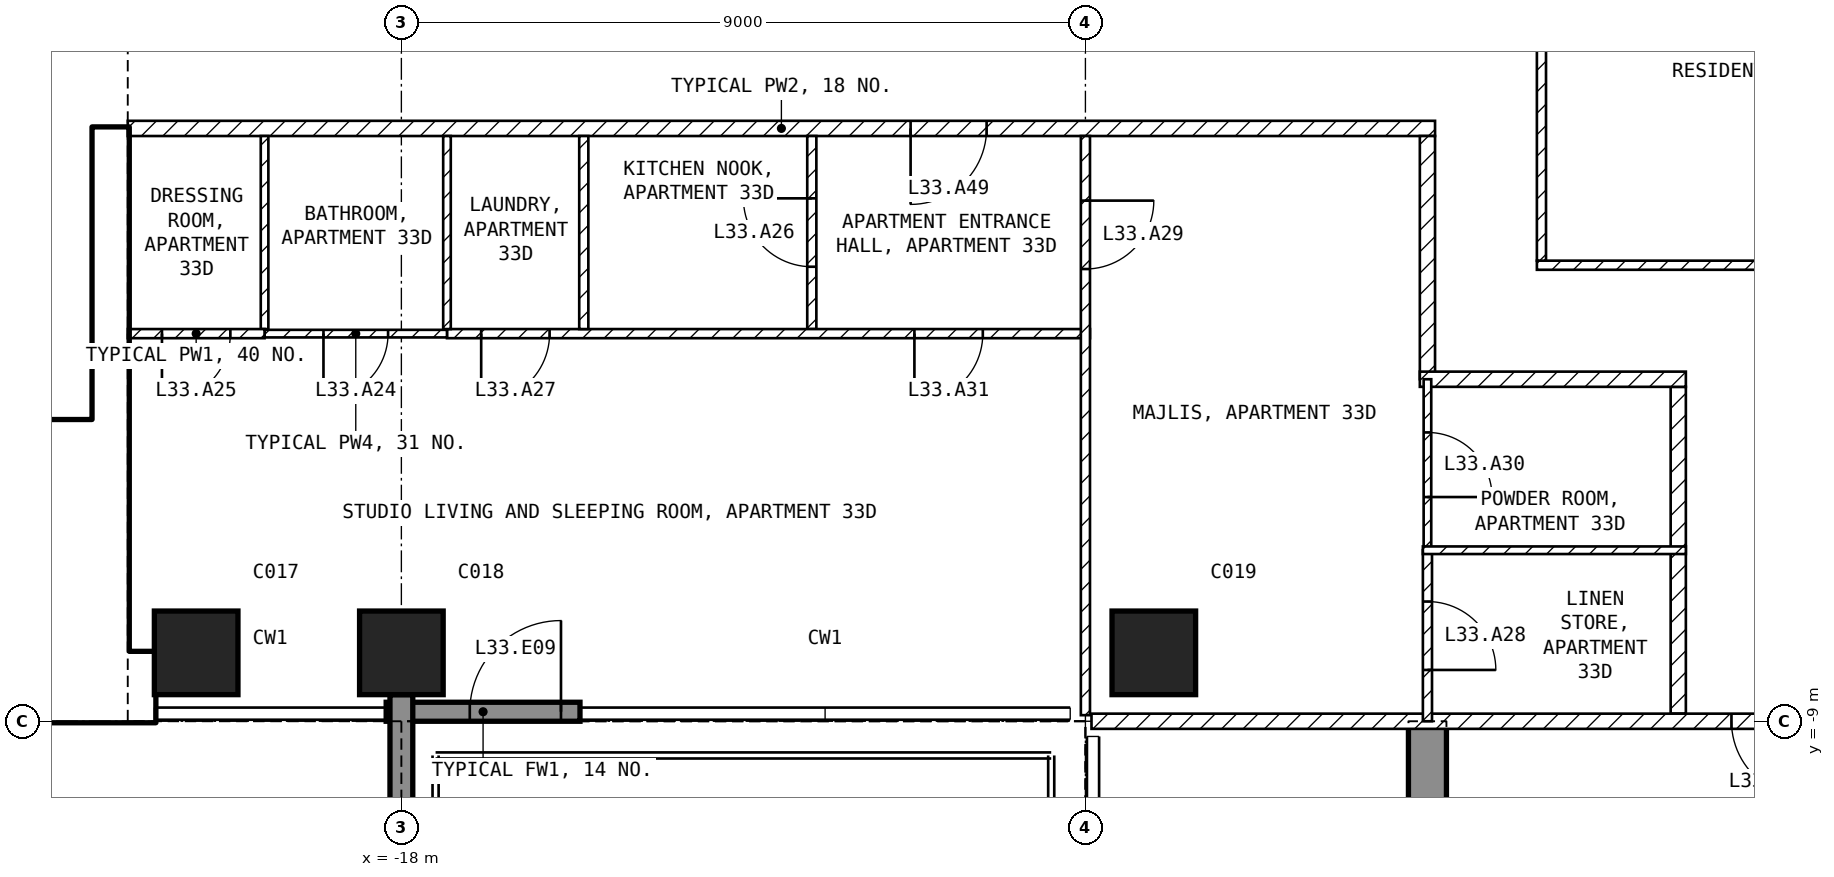
"""IFC4 building model, lengths in metres.
Left out: names, types, materials, properties, quantities, classifications, styles, units other than length and angle.
Written with IfcOpenShell. Run it as: python <this file> out.ifc"""

import sys

from ifc_helpers import new_model, si_unit, direction, frame, frame_2d, origin, origin_2d, place, context, subcontext, project, spatial, polyline, rectangle, outline, extrude, element, fill, save


model = new_model("IFC4")
c1 = context("Model", 3, precision=1e-05, world=origin(), true_north=direction((0.0, 1.0)))
c2 = subcontext(c1, "Body", "Model", "MODEL_VIEW")
j1 = project(units=[si_unit("LENGTHUNIT", "METRE"), si_unit("PLANEANGLEUNIT", "RADIAN")], contexts=[c1])
p1 = place(None, origin())
s1 = spatial("IfcSite", under=j1, at=p1, CompositionType="ELEMENT")
p2 = place(p1, origin())
s2 = spatial("IfcBuilding", under=s1, at=p2, CompositionType="ELEMENT")
p3 = place(p2, frame((0.0, 0.0, 137.4)))
s3 = spatial("IfcBuildingStorey", under=s2, at=p3, CompositionType="ELEMENT", Elevation=137.4)
for number, where, z_axis, x_axis in (
    (1, (-20.7, -8.1, -0.25), (0.0, 0.0, 1.0), (1.0, 0.0, 0.0)),
    (2, (-18.0, -8.1, -0.25), (0.0, 0.0, 1.0), (1.0, 0.0, 0.0)),
    (3, (-8.1, -8.1, -0.25), (0.0, 0.0, 1.0), (1.0, 0.0, 0.0)),
):
    element("IfcColumn", number, at=place(p3, frame(where, z_axis=z_axis, x_axis=x_axis)), inside=s3, PredefinedType="COLUMN", context=c2, shape_type="SweptSolid", body=[
        extrude(rectangle(XDim=1.1, YDim=1.1, at=origin_2d()), origin(), (0.0, 0.0, 1.0), 3.5),
    ])
p4 = place(p3, frame((-4.75, -20.15, -0.25), z_axis=(1.0, 0.0, 0.0), x_axis=(0.0, 1.0, 0.0)))
e4 = element("IfcWall", 4, at=p4, inside=s3, PredefinedType="SHEAR", context=c2, shape_type="SweptSolid", body=[
    extrude(outline(polyline([(0.0, 0.0), (6.65, 0.0), (6.65, 2.65), (9.05, 2.65), (9.05, 0.0), (11.15, 0.0), (11.15, 3.5), (0.0, 3.5), (0.0, 0.0)])), origin(), (0.0, 0.0, 1.0), 0.5),
])
p5 = place(p3, frame((-18.2, -8.875, 0.0), z_axis=(0.0, 0.0, 1.0), x_axis=(1.0, 0.0, 0.0)))
e5 = element("IfcWall", 5, at=p5, inside=s3, PredefinedType="SOLIDWALL", context=c2, shape_type="SweptSolid", body=[
    extrude(rectangle(XDim=2.55, YDim=0.25, at=frame_2d((1.275, 0.0))), origin(), (0.0, 0.0, 1.0), 3.25),
])
p6 = place(p5, frame((1.1, 0.0, 0.0)))
e6 = element("IfcOpeningElement", 6, at=p6, cuts=e5, PredefinedType="OPENING", context=c2, shape_type="SweptSolid", body=[
    extrude(rectangle(XDim=1.2, YDim=2.4, at=frame_2d((0.6, 1.2))), frame((0.0, 0.135, 0.0), z_axis=(0.0, -1.0, 0.0), x_axis=(1.0, 0.0, 0.0)), (0.0, 0.0, 1.0), 0.27),
])
p7 = place(p3, frame((-18.0, -8.65, 0.0), z_axis=(0.0, 0.0, 1.0), x_axis=(0.0, -1.0, 0.0)))
e7 = element("IfcWall", 7, at=p7, inside=s3, PredefinedType="SOLIDWALL", context=c2, shape_type="SweptSolid", body=[
    extrude(rectangle(XDim=3.09, YDim=0.3, at=frame_2d((1.545, 0.0))), origin(), (0.0, 0.0, 1.0), 3.25),
])
p8 = place(p3, frame((-30.2, -8.55, 0.0), z_axis=(0.0, 0.0, 1.0), x_axis=(1.0, 0.0, 0.0)))
e8 = element("IfcWall", 8, at=p8, inside=s3, PredefinedType="SHEAR", context=c2, shape_type="SweptSolid", body=[
    extrude(rectangle(XDim=8.95, YDim=0.9, at=frame_2d((4.475, 0.0))), origin(), (0.0, 0.0, 1.0), 3.25),
])
p9 = place(p3, frame((-21.825, -8.1, 0.0), z_axis=(0.0, 0.0, 1.0), x_axis=(0.0, 1.0, 0.0)))
e9 = element("IfcWall", 9, at=p9, inside=s3, PredefinedType="SHEAR", context=c2, shape_type="SweptSolid", body=[
    extrude(rectangle(XDim=6.9, YDim=0.45, at=frame_2d((3.45, 0.0))), origin(), (0.0, 0.0, 1.0), 3.25),
])
p10 = place(p3, frame((-28.35, -5.15, 0.0), z_axis=(0.0, 0.0, 1.0), x_axis=(1.0, 0.0, 0.0)))
e10 = element("IfcWall", 10, at=p10, inside=s3, PredefinedType="SOLIDWALL", context=c2, shape_type="SweptSolid", body=[
    extrude(rectangle(XDim=6.3, YDim=0.2, at=frame_2d((3.15, 0.0))), origin(), (0.0, 0.0, 1.0), 3.25),
])
p11 = place(p10, frame((5.1, 0.0, 0.0)))
e11 = element("IfcOpeningElement", 11, at=p11, cuts=e10, PredefinedType="OPENING", context=c2, shape_type="SweptSolid", body=[
    extrude(rectangle(XDim=1.0, YDim=2.1, at=frame_2d((0.5, 1.05))), frame((0.0, 0.11, 0.0), z_axis=(0.0, -1.0, 0.0), x_axis=(1.0, 0.0, 0.0)), (0.0, 0.0, 1.0), 0.22),
])
p12 = place(p3, frame((-3.06, -3.0, 0.0), z_axis=(0.0, 0.0, 1.0), x_axis=(1.0, 0.0, 0.0)))
e12 = element("IfcWall", 12, at=p12, inside=s3, PredefinedType="PARTITIONING", context=c2, shape_type="SweptSolid", body=[
    extrude(rectangle(XDim=6.12, YDim=0.12, at=frame_2d((3.06, 0.0))), origin(), (0.0, 0.0, 1.0), 3.25),
])
p13 = place(p3, frame((-3.0, 2.94, 0.0), z_axis=(0.0, 0.0, 1.0), x_axis=(0.0, -1.0, 0.0)))
e13 = element("IfcWall", 13, at=p13, inside=s3, PredefinedType="PARTITIONING", context=c2, shape_type="SweptSolid", body=[
    extrude(rectangle(XDim=5.88, YDim=0.12, at=frame_2d((2.94, 0.0))), origin(), (0.0, 0.0, 1.0), 3.25),
])
p14 = place(p3, frame((-4.4, -1.2, 0.0), z_axis=(0.0, 0.0, 1.0), x_axis=(-1.0, 0.0, 0.0)))
e14 = element("IfcWall", 14, at=p14, inside=s3, PredefinedType="PARTITIONING", context=c2, shape_type="SweptSolid", body=[
    extrude(rectangle(XDim=17.2, YDim=0.2, at=frame_2d((8.6, 0.0))), origin(), (0.0, 0.0, 1.0), 3.25),
])
p15 = place(p14, frame((5.9, 0.0, 0.0)))
e15 = element("IfcOpeningElement", 15, at=p15, cuts=e14, PredefinedType="OPENING", context=c2, shape_type="SweptSolid", body=[
    extrude(rectangle(XDim=1.0, YDim=2.1, at=frame_2d((0.5, 1.05))), frame((0.0, 0.11, 0.0), z_axis=(0.0, -1.0, 0.0), x_axis=(1.0, 0.0, 0.0)), (0.0, 0.0, 1.0), 0.22),
])
p16 = place(p3, frame((-4.5, -4.5, 0.0), z_axis=(0.0, 0.0, 1.0), x_axis=(0.0, 1.0, 0.0)))
e16 = element("IfcWall", 16, at=p16, inside=s3, PredefinedType="PARTITIONING", context=c2, shape_type="SweptSolid", body=[
    extrude(rectangle(XDim=3.2, YDim=0.2, at=frame_2d((1.6, 0.0))), origin(), (0.0, 0.0, 1.0), 3.25),
])
p17 = place(p3, frame((-1.2, -8.9, 0.0), z_axis=(0.0, 0.0, 1.0), x_axis=(0.0, 1.0, 0.0)))
e17 = element("IfcWall", 17, at=p17, inside=s3, PredefinedType="PARTITIONING", context=c2, shape_type="SweptSolid", body=[
    extrude(rectangle(XDim=4.3, YDim=0.2, at=frame_2d((2.15, 0.0))), origin(), (0.0, 0.0, 1.0), 3.25),
])
p18 = place(p3, frame((-1.1, -4.5, 0.0), z_axis=(0.0, 0.0, 1.0), x_axis=(-1.0, 0.0, 0.0)))
e18 = element("IfcWall", 18, at=p18, inside=s3, PredefinedType="PARTITIONING", context=c2, shape_type="SweptSolid", body=[
    extrude(rectangle(XDim=3.5, YDim=0.2, at=frame_2d((1.75, 0.0))), origin(), (0.0, 0.0, 1.0), 3.25),
])
p19 = place(p3, frame((8.92, -9.0, 0.0), z_axis=(0.0, 0.0, 1.0), x_axis=(-1.0, 0.0, 0.0)))
e19 = element("IfcWall", 19, at=p19, inside=s3, PredefinedType="PARTITIONING", context=c2, shape_type="SweptSolid", body=[
    extrude(rectangle(XDim=17.84, YDim=0.2, at=frame_2d((8.92, 0.0))), origin(), (0.0, 0.0, 1.0), 3.25),
])
p20 = place(p19, frame((8.42, 0.0, 0.0)))
e20 = element("IfcOpeningElement", 20, at=p20, cuts=e19, PredefinedType="OPENING", context=c2, shape_type="SweptSolid", body=[
    extrude(rectangle(XDim=1.0, YDim=2.1, at=frame_2d((0.5, 1.05))), frame((0.0, 0.11, 0.0), z_axis=(0.0, -1.0, 0.0), x_axis=(1.0, 0.0, 0.0)), (0.0, 0.0, 1.0), 0.22),
])
p21 = place(p3, frame((-12.6, -3.84, 0.0), z_axis=(0.0, 0.0, 1.0), x_axis=(0.0, 1.0, 0.0)))
e21 = element("IfcWall", 21, at=p21, inside=s3, PredefinedType="PARTITIONING", context=c2, shape_type="SweptSolid", body=[
    extrude(rectangle(XDim=2.54, YDim=0.12, at=frame_2d((1.27, 0.0))), origin(), (0.0, 0.0, 1.0), 3.25),
])
p22 = place(p21, frame((0.82, 0.0, 0.0)))
e22 = element("IfcOpeningElement", 22, at=p22, cuts=e21, PredefinedType="OPENING", context=c2, shape_type="SweptSolid", body=[
    extrude(rectangle(XDim=0.9, YDim=2.1, at=frame_2d((0.45, 1.05))), frame((0.0, 0.07, 0.0), z_axis=(0.0, -1.0, 0.0), x_axis=(1.0, 0.0, 0.0)), (0.0, 0.0, 1.0), 0.14),
])
p23 = place(p3, frame((-8.94, -3.9, 0.0), z_axis=(0.0, 0.0, 1.0), x_axis=(-1.0, 0.0, 0.0)))
e23 = element("IfcWall", 23, at=p23, inside=s3, PredefinedType="PARTITIONING", context=c2, shape_type="SweptSolid", body=[
    extrude(rectangle(XDim=8.46, YDim=0.12, at=frame_2d((4.23, 0.0))), origin(), (0.0, 0.0, 1.0), 3.25),
])
p24 = place(p23, frame((7.11, 0.0, 0.0)))
e24 = element("IfcOpeningElement", 24, at=p24, cuts=e23, PredefinedType="OPENING", context=c2, shape_type="SweptSolid", body=[
    extrude(rectangle(XDim=0.9, YDim=2.1, at=frame_2d((0.45, 1.05))), frame((0.0, 0.07, 0.0), z_axis=(0.0, -1.0, 0.0), x_axis=(1.0, 0.0, 0.0)), (0.0, 0.0, 1.0), 0.14),
])
p25 = place(p23, frame((1.41, 0.0, 0.0)))
e25 = element("IfcOpeningElement", 25, at=p25, cuts=e23, PredefinedType="OPENING", context=c2, shape_type="SweptSolid", body=[
    extrude(rectangle(XDim=0.9, YDim=2.1, at=frame_2d((0.45, 1.05))), frame((0.0, 0.07, 0.0), z_axis=(0.0, -1.0, 0.0), x_axis=(1.0, 0.0, 0.0)), (0.0, 0.0, 1.0), 0.14),
])
p26 = place(p3, frame((-9.0, -1.3, 0.0), z_axis=(0.0, 0.0, 1.0), x_axis=(0.0, -1.0, 0.0)))
e26 = element("IfcWall", 26, at=p26, inside=s3, PredefinedType="PARTITIONING", context=c2, shape_type="SweptSolid", body=[
    extrude(rectangle(XDim=7.62, YDim=0.12, at=frame_2d((3.81, 0.0))), origin(), (0.0, 0.0, 1.0), 3.25),
])
p27 = place(p26, frame((0.85, 0.0, 0.0)))
e27 = element("IfcOpeningElement", 27, at=p27, cuts=e26, PredefinedType="OPENING", context=c2, shape_type="SweptSolid", body=[
    extrude(rectangle(XDim=0.9, YDim=2.1, at=frame_2d((0.45, 1.05))), frame((0.0, 0.07, 0.0), z_axis=(0.0, -1.0, 0.0), x_axis=(1.0, 0.0, 0.0)), (0.0, 0.0, 1.0), 0.14),
])
p28 = place(p3, frame((-15.6, -3.84, 0.0), z_axis=(0.0, 0.0, 1.0), x_axis=(0.0, 1.0, 0.0)))
e28 = element("IfcWall", 28, at=p28, inside=s3, PredefinedType="PARTITIONING", context=c2, shape_type="SweptSolid", body=[
    extrude(rectangle(XDim=2.54, YDim=0.12, at=frame_2d((1.27, 0.0))), origin(), (0.0, 0.0, 1.0), 3.25),
])
for number, where, z_axis, x_axis in (
    (29, (-17.4, -3.84, 0.0), (0.0, 0.0, 1.0), (0.0, 1.0, 0.0)),
    (30, (-19.8, -3.84, 0.0), (0.0, 0.0, 1.0), (0.0, 1.0, 0.0)),
):
    element("IfcWall", number, at=place(p3, frame(where, z_axis=z_axis, x_axis=x_axis)), inside=s3, PredefinedType="PARTITIONING", context=c2, shape_type="SweptSolid", body=[
        extrude(rectangle(XDim=2.54, YDim=0.1, at=frame_2d((1.27, 0.0))), origin(), (0.0, 0.0, 1.0), 3.25),
    ])
p29 = place(p3, frame((-17.4, -3.9, 0.0), z_axis=(0.0, 0.0, 1.0), x_axis=(-1.0, 0.0, 0.0)))
e31 = element("IfcWall", 31, at=p29, inside=s3, PredefinedType="PARTITIONING", context=c2, shape_type="SweptSolid", body=[
    extrude(rectangle(XDim=2.4, YDim=0.1, at=frame_2d((1.2, 0.0))), origin(), (0.0, 0.0, 1.0), 3.25),
])
p30 = place(p29, frame((0.775, 0.0, 0.0)))
e32 = element("IfcOpeningElement", 32, at=p30, cuts=e31, PredefinedType="OPENING", context=c2, shape_type="SweptSolid", body=[
    extrude(rectangle(XDim=0.85, YDim=2.1, at=frame_2d((0.425, 1.05))), frame((0.0, 0.06, 0.0), z_axis=(0.0, -1.0, 0.0), x_axis=(1.0, 0.0, 0.0)), (0.0, 0.0, 1.0), 0.12),
])
p31 = place(p3, frame((-19.8, -3.9, 0.0), z_axis=(0.0, 0.0, 1.0), x_axis=(-1.0, 0.0, 0.0)))
e33 = element("IfcWall", 33, at=p31, inside=s3, PredefinedType="PARTITIONING", context=c2, shape_type="SweptSolid", body=[
    extrude(rectangle(XDim=1.8, YDim=0.12, at=frame_2d((0.9, 0.0))), origin(), (0.0, 0.0, 1.0), 3.25),
])
p32 = place(p31, frame((0.45, 0.0, 0.0)))
e34 = element("IfcOpeningElement", 34, at=p32, cuts=e33, PredefinedType="OPENING", context=c2, shape_type="SweptSolid", body=[
    extrude(rectangle(XDim=0.9, YDim=2.1, at=frame_2d((0.45, 1.05))), frame((0.0, 0.07, 0.0), z_axis=(0.0, -1.0, 0.0), x_axis=(1.0, 0.0, 0.0)), (0.0, 0.0, 1.0), 0.14),
])
p33 = place(p3, frame((-4.5, -4.5, 0.0), z_axis=(0.0, 0.0, 1.0), x_axis=(0.0, -1.0, 0.0)))
e35 = element("IfcWall", 35, at=p33, inside=s3, PredefinedType="PARTITIONING", context=c2, shape_type="SweptSolid", body=[
    extrude(rectangle(XDim=2.25, YDim=0.1, at=frame_2d((1.125, 0.0))), origin(), (0.0, 0.0, 1.0), 3.25),
])
p34 = place(p33, frame((0.7, 0.0, 0.0)))
e36 = element("IfcOpeningElement", 36, at=p34, cuts=e35, PredefinedType="OPENING", context=c2, shape_type="SweptSolid", body=[
    extrude(rectangle(XDim=0.85, YDim=2.1, at=frame_2d((0.425, 1.05))), frame((0.0, 0.06, 0.0), z_axis=(0.0, -1.0, 0.0), x_axis=(1.0, 0.0, 0.0)), (0.0, 0.0, 1.0), 0.12),
])
p35 = place(p3, frame((-4.5, -6.75, 0.0), z_axis=(0.0, 0.0, 1.0), x_axis=(0.0, -1.0, 0.0)))
e37 = element("IfcWall", 37, at=p35, inside=s3, PredefinedType="PARTITIONING", context=c2, shape_type="SweptSolid", body=[
    extrude(rectangle(XDim=2.25, YDim=0.12, at=frame_2d((1.125, 0.0))), origin(), (0.0, 0.0, 1.0), 3.25),
])
p36 = place(p35, frame((0.675, 0.0, 0.0)))
e38 = element("IfcOpeningElement", 38, at=p36, cuts=e37, PredefinedType="OPENING", context=c2, shape_type="SweptSolid", body=[
    extrude(rectangle(XDim=0.9, YDim=2.1, at=frame_2d((0.45, 1.05))), frame((0.0, 0.07, 0.0), z_axis=(0.0, -1.0, 0.0), x_axis=(1.0, 0.0, 0.0)), (0.0, 0.0, 1.0), 0.14),
])
p37 = place(p3, frame((-1.1, -6.75, 0.0), z_axis=(0.0, 0.0, 1.0), x_axis=(-1.0, 0.0, 0.0)))
e39 = element("IfcWall", 39, at=p37, inside=s3, PredefinedType="PARTITIONING", context=c2, shape_type="SweptSolid", body=[
    extrude(rectangle(XDim=3.46, YDim=0.1, at=frame_2d((1.73, 0.0))), origin(), (0.0, 0.0, 1.0), 3.25),
])
p38 = place(p6, origin())
e40 = element("IfcDoor", 40, at=p38, inside=s3, OperationType="SINGLE_SWING_RIGHT", PredefinedType="DOOR", context=c2, shape_type="SweptSolid", body=[
    extrude(rectangle(XDim=1.2, YDim=2.4, at=frame_2d((0.6, 1.2))), frame((0.0, 0.025, 0.0), z_axis=(0.0, -1.0, 0.0), x_axis=(1.0, 0.0, 0.0)), (0.0, 0.0, 1.0), 0.05),
])
fill(e6, e40)
p39 = place(p11, origin())
e41 = element("IfcDoor", 41, at=p39, inside=s3, OperationType="SINGLE_SWING_LEFT", PredefinedType="DOOR", context=c2, shape_type="SweptSolid", body=[
    extrude(rectangle(XDim=1.0, YDim=2.1, at=frame_2d((0.5, 1.05))), frame((0.0, 0.025, 0.0), z_axis=(0.0, -1.0, 0.0), x_axis=(1.0, 0.0, 0.0)), (0.0, 0.0, 1.0), 0.05),
])
fill(e11, e41)
p40 = place(p30, origin())
e42 = element("IfcDoor", 42, at=p40, inside=s3, OperationType="SINGLE_SWING_RIGHT", PredefinedType="DOOR", context=c2, shape_type="SweptSolid", body=[
    extrude(rectangle(XDim=0.85, YDim=2.1, at=frame_2d((0.425, 1.05))), frame((0.0, 0.025, 0.0), z_axis=(0.0, -1.0, 0.0), x_axis=(1.0, 0.0, 0.0)), (0.0, 0.0, 1.0), 0.05),
])
fill(e32, e42)
p41 = place(p32, origin())
e43 = element("IfcDoor", 43, at=p41, inside=s3, OperationType="SINGLE_SWING_RIGHT", PredefinedType="DOOR", context=c2, shape_type="SweptSolid", body=[
    extrude(rectangle(XDim=0.9, YDim=2.1, at=frame_2d((0.45, 1.05))), frame((0.0, 0.025, 0.0), z_axis=(0.0, -1.0, 0.0), x_axis=(1.0, 0.0, 0.0)), (0.0, 0.0, 1.0), 0.05),
])
fill(e34, e43)
p42 = place(p22, origin())
e44 = element("IfcDoor", 44, at=p42, inside=s3, OperationType="SINGLE_SWING_RIGHT", PredefinedType="DOOR", context=c2, shape_type="SweptSolid", body=[
    extrude(rectangle(XDim=0.9, YDim=2.1, at=frame_2d((0.45, 1.05))), frame((0.0, 0.025, 0.0), z_axis=(0.0, -1.0, 0.0), x_axis=(1.0, 0.0, 0.0)), (0.0, 0.0, 1.0), 0.05),
])
fill(e22, e44)
p43 = place(p24, origin())
e45 = element("IfcDoor", 45, at=p43, inside=s3, OperationType="SINGLE_SWING_RIGHT", PredefinedType="DOOR", context=c2, shape_type="SweptSolid", body=[
    extrude(rectangle(XDim=0.9, YDim=2.1, at=frame_2d((0.45, 1.05))), frame((0.0, 0.025, 0.0), z_axis=(0.0, -1.0, 0.0), x_axis=(1.0, 0.0, 0.0)), (0.0, 0.0, 1.0), 0.05),
])
fill(e24, e45)
p44 = place(p36, origin())
e46 = element("IfcDoor", 46, at=p44, inside=s3, OperationType="SINGLE_SWING_RIGHT", PredefinedType="DOOR", context=c2, shape_type="SweptSolid", body=[
    extrude(rectangle(XDim=0.9, YDim=2.1, at=frame_2d((0.45, 1.05))), frame((0.0, 0.025, 0.0), z_axis=(0.0, -1.0, 0.0), x_axis=(1.0, 0.0, 0.0)), (0.0, 0.0, 1.0), 0.05),
])
fill(e38, e46)
p45 = place(p27, origin())
e47 = element("IfcDoor", 47, at=p45, inside=s3, OperationType="SINGLE_SWING_LEFT", PredefinedType="DOOR", context=c2, shape_type="SweptSolid", body=[
    extrude(rectangle(XDim=0.9, YDim=2.1, at=frame_2d((0.45, 1.05))), frame((0.0, 0.025, 0.0), z_axis=(0.0, -1.0, 0.0), x_axis=(1.0, 0.0, 0.0)), (0.0, 0.0, 1.0), 0.05),
])
fill(e27, e47)
p46 = place(p34, origin())
e48 = element("IfcDoor", 48, at=p46, inside=s3, OperationType="SINGLE_SWING_RIGHT", PredefinedType="DOOR", context=c2, shape_type="SweptSolid", body=[
    extrude(rectangle(XDim=0.85, YDim=2.1, at=frame_2d((0.425, 1.05))), frame((0.0, 0.025, 0.0), z_axis=(0.0, -1.0, 0.0), x_axis=(1.0, 0.0, 0.0)), (0.0, 0.0, 1.0), 0.05),
])
fill(e36, e48)
p47 = place(p25, origin())
e49 = element("IfcDoor", 49, at=p47, inside=s3, OperationType="SINGLE_SWING_RIGHT", PredefinedType="DOOR", context=c2, shape_type="SweptSolid", body=[
    extrude(rectangle(XDim=0.9, YDim=2.1, at=frame_2d((0.45, 1.05))), frame((0.0, 0.025, 0.0), z_axis=(0.0, -1.0, 0.0), x_axis=(1.0, 0.0, 0.0)), (0.0, 0.0, 1.0), 0.05),
])
fill(e25, e49)
p48 = place(p20, origin())
e50 = element("IfcDoor", 50, at=p48, inside=s3, OperationType="SINGLE_SWING_LEFT", PredefinedType="DOOR", context=c2, shape_type="SweptSolid", body=[
    extrude(rectangle(XDim=1.0, YDim=2.1, at=frame_2d((0.5, 1.05))), frame((0.0, 0.025, 0.0), z_axis=(0.0, -1.0, 0.0), x_axis=(1.0, 0.0, 0.0)), (0.0, 0.0, 1.0), 0.05),
])
fill(e20, e50)
p49 = place(p15, origin())
e51 = element("IfcDoor", 51, at=p49, inside=s3, OperationType="SINGLE_SWING_RIGHT", PredefinedType="DOOR", context=c2, shape_type="SweptSolid", body=[
    extrude(rectangle(XDim=1.0, YDim=2.1, at=frame_2d((0.5, 1.05))), frame((0.0, 0.025, 0.0), z_axis=(0.0, -1.0, 0.0), x_axis=(1.0, 0.0, 0.0)), (0.0, 0.0, 1.0), 0.05),
])
fill(e15, e51)
save(model, sys.argv[1])
